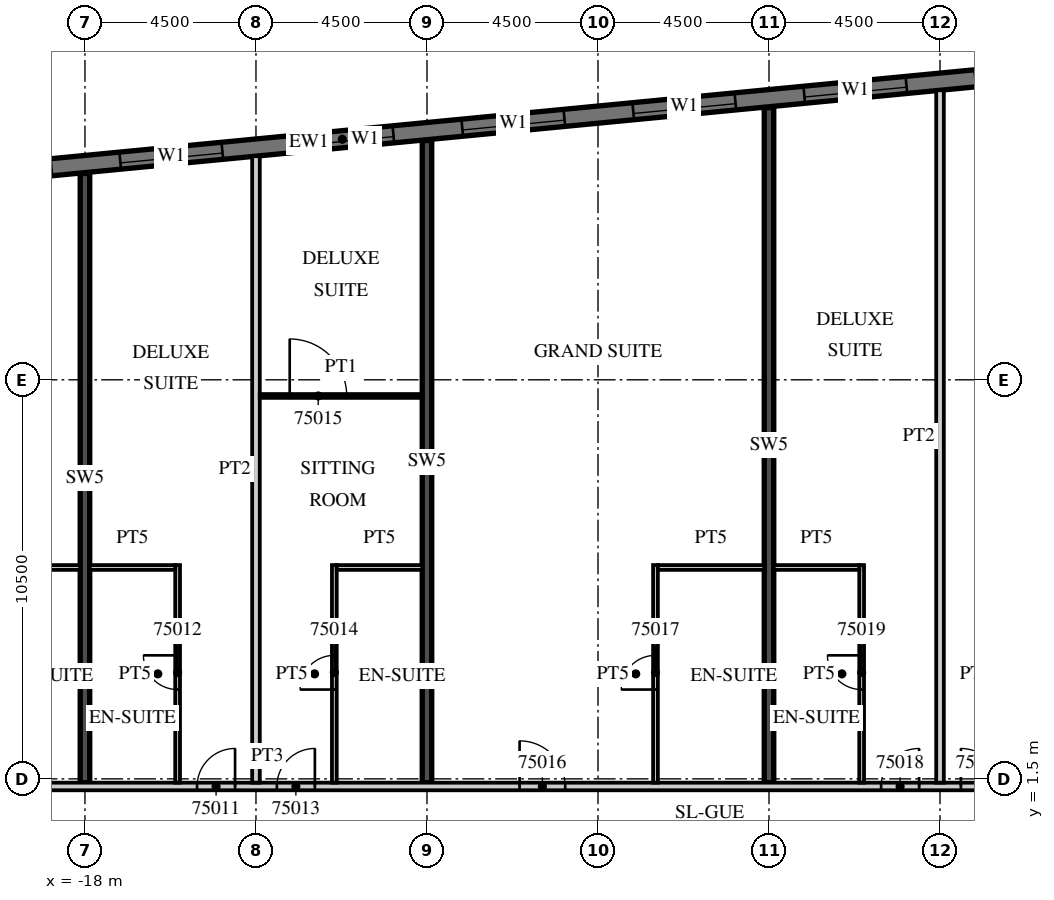
"""IFC4 building model, lengths in metres.
Left out: names, types, materials, properties, quantities, classifications, styles, units other than length and angle.
Written with IfcOpenShell. Run it as: python <this file> out.ifc"""

import sys

from ifc_helpers import new_model, si_unit, direction, frame, frame_2d, origin, place, context, subcontext, project, spatial, rectangle, extrude, element, fill, save


model = new_model("IFC4")
c1 = context("Model", 3, precision=1e-05, world=origin(), true_north=direction((0.0, 1.0)))
c2 = subcontext(c1, "Body", "Model", "MODEL_VIEW")
j1 = project(units=[si_unit("LENGTHUNIT", "METRE"), si_unit("PLANEANGLEUNIT", "RADIAN")], contexts=[c1])
p1 = place(None, origin())
s1 = spatial("IfcSite", under=j1, at=p1, CompositionType="ELEMENT")
p2 = place(p1, origin())
s2 = spatial("IfcBuilding", under=s1, at=p2, CompositionType="ELEMENT")
p3 = place(p2, frame((0.0, 0.0, 298.2)))
s3 = spatial("IfcBuildingStorey", under=s2, at=p3, CompositionType="ELEMENT", Elevation=298.2)
p4 = place(p3, frame((-18.0, 1.4, 0.0), z_axis=(0.0, 0.0, 1.0), x_axis=(0.0, 1.0, 0.0)))
e1 = element("IfcWall", 1, at=p4, inside=s3, PredefinedType="SHEAR", context=c2, shape_type="SweptSolid", body=[
    extrude(rectangle(XDim=16.03, YDim=0.25, at=frame_2d((8.015, 0.0))), origin(), (0.0, 0.0, 1.0), 3.3),
])
p5 = place(p3, frame((-9.0, 1.4, 0.0), z_axis=(0.0, 0.0, 1.0), x_axis=(0.0, 1.0, 0.0)))
e2 = element("IfcWall", 2, at=p5, inside=s3, PredefinedType="SHEAR", context=c2, shape_type="SweptSolid", body=[
    extrude(rectangle(XDim=16.896, YDim=0.25, at=frame_2d((8.448, 0.0))), origin(), (0.0, 0.0, 1.0), 3.3),
])
p6 = place(p3, frame((0.0, 1.4, 0.0), z_axis=(0.0, 0.0, 1.0), x_axis=(0.0, 1.0, 0.0)))
e3 = element("IfcWall", 3, at=p6, inside=s3, PredefinedType="SHEAR", context=c2, shape_type="SweptSolid", body=[
    extrude(rectangle(XDim=17.763, YDim=0.25, at=frame_2d((8.881, 0.0))), origin(), (0.0, 0.0, 1.0), 3.3),
])
p7 = place(p3, frame((13.521, 20.713, 0.0), z_axis=(0.0, 0.0, 1.0), x_axis=(-0.995396277313, -0.095844932638, 0.0)))
e4 = element("IfcWall", 4, at=p7, inside=s3, PredefinedType="SOLIDWALL", context=c2, shape_type="SweptSolid", body=[
    extrude(rectangle(XDim=51.495, YDim=0.45, at=frame_2d((25.748, 0.0))), origin(), (0.0, 0.0, 1.0), 3.02),
])
p8 = place(p7, frame((0.91, 0.0, 0.45)))
e5 = element("IfcOpeningElement", 5, at=p8, cuts=e4, PredefinedType="OPENING", context=c2, shape_type="SweptSolid", body=[
    extrude(rectangle(XDim=2.7, YDim=2.25, at=frame_2d((1.35, 1.125))), frame((0.0, 0.235, 0.0), z_axis=(0.0, -1.0, 0.0), x_axis=(1.0, 0.0, 0.0)), (0.0, 0.0, 1.0), 0.47),
])
p9 = place(p7, frame((5.431, 0.0, 0.45)))
e6 = element("IfcOpeningElement", 6, at=p9, cuts=e4, PredefinedType="OPENING", context=c2, shape_type="SweptSolid", body=[
    extrude(rectangle(XDim=2.7, YDim=2.25, at=frame_2d((1.35, 1.125))), frame((0.0, 0.235, 0.0), z_axis=(0.0, -1.0, 0.0), x_axis=(1.0, 0.0, 0.0)), (0.0, 0.0, 1.0), 0.47),
])
p10 = place(p7, frame((9.952, 0.0, 0.45)))
e7 = element("IfcOpeningElement", 7, at=p10, cuts=e4, PredefinedType="OPENING", context=c2, shape_type="SweptSolid", body=[
    extrude(rectangle(XDim=2.7, YDim=2.25, at=frame_2d((1.35, 1.125))), frame((0.0, 0.235, 0.0), z_axis=(0.0, -1.0, 0.0), x_axis=(1.0, 0.0, 0.0)), (0.0, 0.0, 1.0), 0.47),
])
p11 = place(p7, frame((14.473, 0.0, 0.45)))
e8 = element("IfcOpeningElement", 8, at=p11, cuts=e4, PredefinedType="OPENING", context=c2, shape_type="SweptSolid", body=[
    extrude(rectangle(XDim=2.7, YDim=2.25, at=frame_2d((1.35, 1.125))), frame((0.0, 0.235, 0.0), z_axis=(0.0, -1.0, 0.0), x_axis=(1.0, 0.0, 0.0)), (0.0, 0.0, 1.0), 0.47),
])
p12 = place(p7, frame((18.994, 0.0, 0.45)))
e9 = element("IfcOpeningElement", 9, at=p12, cuts=e4, PredefinedType="OPENING", context=c2, shape_type="SweptSolid", body=[
    extrude(rectangle(XDim=2.7, YDim=2.25, at=frame_2d((1.35, 1.125))), frame((0.0, 0.235, 0.0), z_axis=(0.0, -1.0, 0.0), x_axis=(1.0, 0.0, 0.0)), (0.0, 0.0, 1.0), 0.47),
])
p13 = place(p7, frame((23.514, 0.0, 0.45)))
e10 = element("IfcOpeningElement", 10, at=p13, cuts=e4, PredefinedType="OPENING", context=c2, shape_type="SweptSolid", body=[
    extrude(rectangle(XDim=2.7, YDim=2.25, at=frame_2d((1.35, 1.125))), frame((0.0, 0.235, 0.0), z_axis=(0.0, -1.0, 0.0), x_axis=(1.0, 0.0, 0.0)), (0.0, 0.0, 1.0), 0.47),
])
p14 = place(p7, frame((28.035, 0.0, 0.45)))
e11 = element("IfcOpeningElement", 11, at=p14, cuts=e4, PredefinedType="OPENING", context=c2, shape_type="SweptSolid", body=[
    extrude(rectangle(XDim=2.7, YDim=2.25, at=frame_2d((1.35, 1.125))), frame((0.0, 0.235, 0.0), z_axis=(0.0, -1.0, 0.0), x_axis=(1.0, 0.0, 0.0)), (0.0, 0.0, 1.0), 0.47),
])
p15 = place(p7, frame((32.556, 0.0, 0.45)))
e12 = element("IfcOpeningElement", 12, at=p15, cuts=e4, PredefinedType="OPENING", context=c2, shape_type="SweptSolid", body=[
    extrude(rectangle(XDim=2.7, YDim=2.25, at=frame_2d((1.35, 1.125))), frame((0.0, 0.235, 0.0), z_axis=(0.0, -1.0, 0.0), x_axis=(1.0, 0.0, 0.0)), (0.0, 0.0, 1.0), 0.47),
])
p16 = place(p7, frame((37.077, 0.0, 0.45)))
e13 = element("IfcOpeningElement", 13, at=p16, cuts=e4, PredefinedType="OPENING", context=c2, shape_type="SweptSolid", body=[
    extrude(rectangle(XDim=2.7, YDim=2.25, at=frame_2d((1.35, 1.125))), frame((0.0, 0.235, 0.0), z_axis=(0.0, -1.0, 0.0), x_axis=(1.0, 0.0, 0.0)), (0.0, 0.0, 1.0), 0.47),
])
p17 = place(p7, frame((41.598, 0.0, 0.45)))
e14 = element("IfcOpeningElement", 14, at=p17, cuts=e4, PredefinedType="OPENING", context=c2, shape_type="SweptSolid", body=[
    extrude(rectangle(XDim=2.7, YDim=2.25, at=frame_2d((1.35, 1.125))), frame((0.0, 0.235, 0.0), z_axis=(0.0, -1.0, 0.0), x_axis=(1.0, 0.0, 0.0)), (0.0, 0.0, 1.0), 0.47),
])
p18 = place(p7, frame((46.118, 0.0, 0.45)))
e15 = element("IfcOpeningElement", 15, at=p18, cuts=e4, PredefinedType="OPENING", context=c2, shape_type="SweptSolid", body=[
    extrude(rectangle(XDim=2.7, YDim=2.25, at=frame_2d((1.35, 1.125))), frame((0.0, 0.235, 0.0), z_axis=(0.0, -1.0, 0.0), x_axis=(1.0, 0.0, 0.0)), (0.0, 0.0, 1.0), 0.47),
])
p19 = place(p3, frame((-39.909, 1.3, 0.0), z_axis=(0.0, 0.0, 1.0), x_axis=(1.0, 0.0, 0.0)))
e16 = element("IfcWall", 16, at=p19, inside=s3, PredefinedType="PARTITIONING", context=c2, shape_type="SweptSolid", body=[
    extrude(rectangle(XDim=53.409, YDim=0.2, at=frame_2d((26.705, 0.0))), origin(), (0.0, 0.0, 1.0), 3.02),
])
p20 = place(p19, frame((0.255, 0.0, 0.0)))
e17 = element("IfcOpeningElement", 17, at=p20, cuts=e16, PredefinedType="OPENING", context=c2, shape_type="SweptSolid", body=[
    extrude(rectangle(XDim=0.9, YDim=2.1, at=frame_2d((0.45, 1.05))), frame((0.0, 0.11, 0.0), z_axis=(0.0, -1.0, 0.0), x_axis=(1.0, 0.0, 0.0)), (0.0, 0.0, 1.0), 0.22),
])
p21 = place(p19, frame((4.484, 0.0, 0.0)))
e18 = element("IfcOpeningElement", 18, at=p21, cuts=e16, PredefinedType="OPENING", context=c2, shape_type="SweptSolid", body=[
    extrude(rectangle(XDim=1.0, YDim=2.1, at=frame_2d((0.5, 1.05))), frame((0.0, 0.11, 0.0), z_axis=(0.0, -1.0, 0.0), x_axis=(1.0, 0.0, 0.0)), (0.0, 0.0, 1.0), 0.22),
])
p22 = place(p19, frame((11.334, 0.0, 0.0)))
e19 = element("IfcOpeningElement", 19, at=p22, cuts=e16, PredefinedType="OPENING", context=c2, shape_type="SweptSolid", body=[
    extrude(rectangle(XDim=1.0, YDim=2.1, at=frame_2d((0.5, 1.05))), frame((0.0, 0.11, 0.0), z_axis=(0.0, -1.0, 0.0), x_axis=(1.0, 0.0, 0.0)), (0.0, 0.0, 1.0), 0.22),
])
p23 = place(p19, frame((15.347, 0.0, 0.0)))
e20 = element("IfcOpeningElement", 20, at=p23, cuts=e16, PredefinedType="OPENING", context=c2, shape_type="SweptSolid", body=[
    extrude(rectangle(XDim=1.2, YDim=2.1, at=frame_2d((0.6, 1.05))), frame((0.0, 0.11, 0.0), z_axis=(0.0, -1.0, 0.0), x_axis=(1.0, 0.0, 0.0)), (0.0, 0.0, 1.0), 0.22),
])
p24 = place(p19, frame((24.859, 0.0, 0.0)))
e21 = element("IfcOpeningElement", 21, at=p24, cuts=e16, PredefinedType="OPENING", context=c2, shape_type="SweptSolid", body=[
    extrude(rectangle(XDim=1.0, YDim=2.1, at=frame_2d((0.5, 1.05))), frame((0.0, 0.11, 0.0), z_axis=(0.0, -1.0, 0.0), x_axis=(1.0, 0.0, 0.0)), (0.0, 0.0, 1.0), 0.22),
])
p25 = place(p19, frame((26.959, 0.0, 0.0)))
e22 = element("IfcOpeningElement", 22, at=p25, cuts=e16, PredefinedType="OPENING", context=c2, shape_type="SweptSolid", body=[
    extrude(rectangle(XDim=1.0, YDim=2.1, at=frame_2d((0.5, 1.05))), frame((0.0, 0.11, 0.0), z_axis=(0.0, -1.0, 0.0), x_axis=(1.0, 0.0, 0.0)), (0.0, 0.0, 1.0), 0.22),
])
p26 = place(p19, frame((33.346, 0.0, 0.0)))
e23 = element("IfcOpeningElement", 23, at=p26, cuts=e16, PredefinedType="OPENING", context=c2, shape_type="SweptSolid", body=[
    extrude(rectangle(XDim=1.2, YDim=2.1, at=frame_2d((0.6, 1.05))), frame((0.0, 0.11, 0.0), z_axis=(0.0, -1.0, 0.0), x_axis=(1.0, 0.0, 0.0)), (0.0, 0.0, 1.0), 0.22),
])
p27 = place(p19, frame((42.859, 0.0, 0.0)))
e24 = element("IfcOpeningElement", 24, at=p27, cuts=e16, PredefinedType="OPENING", context=c2, shape_type="SweptSolid", body=[
    extrude(rectangle(XDim=1.0, YDim=2.1, at=frame_2d((0.5, 1.05))), frame((0.0, 0.11, 0.0), z_axis=(0.0, -1.0, 0.0), x_axis=(1.0, 0.0, 0.0)), (0.0, 0.0, 1.0), 0.22),
])
p28 = place(p19, frame((44.959, 0.0, 0.0)))
e25 = element("IfcOpeningElement", 25, at=p28, cuts=e16, PredefinedType="OPENING", context=c2, shape_type="SweptSolid", body=[
    extrude(rectangle(XDim=1.0, YDim=2.1, at=frame_2d((0.5, 1.05))), frame((0.0, 0.11, 0.0), z_axis=(0.0, -1.0, 0.0), x_axis=(1.0, 0.0, 0.0)), (0.0, 0.0, 1.0), 0.22),
])
p29 = place(p19, frame((49.484, 0.0, 0.0)))
e26 = element("IfcOpeningElement", 26, at=p29, cuts=e16, PredefinedType="OPENING", context=c2, shape_type="SweptSolid", body=[
    extrude(rectangle(XDim=1.0, YDim=2.1, at=frame_2d((0.5, 1.05))), frame((0.0, 0.11, 0.0), z_axis=(0.0, -1.0, 0.0), x_axis=(1.0, 0.0, 0.0)), (0.0, 0.0, 1.0), 0.22),
])
p30 = place(p3, frame((-20.925, 7.062, 0.0), z_axis=(0.0, 0.0, 1.0), x_axis=(1.0, 0.0, 0.0)))
e27 = element("IfcWall", 27, at=p30, inside=s3, PredefinedType="PARTITIONING", context=c2, shape_type="SweptSolid", body=[
    extrude(rectangle(XDim=2.8, YDim=0.125, at=frame_2d((1.4, 0.0))), origin(), (0.0, 0.0, 1.0), 3.02),
])
p31 = place(p3, frame((-13.5, 1.4, 0.0), z_axis=(0.0, 0.0, 1.0), x_axis=(0.0, 1.0, 0.0)))
e28 = element("IfcWall", 28, at=p31, inside=s3, PredefinedType="PARTITIONING", context=c2, shape_type="SweptSolid", body=[
    extrude(rectangle(XDim=16.485, YDim=0.2, at=frame_2d((8.243, 0.0))), origin(), (0.0, 0.0, 1.0), 3.02),
])
p32 = place(p3, frame((-15.562, 1.4, 0.0), z_axis=(0.0, 0.0, 1.0), x_axis=(0.0, 1.0, 0.0)))
e29 = element("IfcWall", 29, at=p32, inside=s3, PredefinedType="PARTITIONING", context=c2, shape_type="SweptSolid", body=[
    extrude(rectangle(XDim=5.725, YDim=0.125, at=frame_2d((2.863, 0.0))), origin(), (0.0, 0.0, 1.0), 3.02),
])
p33 = place(p32, frame((2.45, 0.0, 0.0)))
e30 = element("IfcOpeningElement", 30, at=p33, cuts=e29, PredefinedType="OPENING", context=c2, shape_type="SweptSolid", body=[
    extrude(rectangle(XDim=0.9, YDim=2.1, at=frame_2d((0.45, 1.05))), frame((0.0, 0.073, 0.0), z_axis=(0.0, -1.0, 0.0), x_axis=(1.0, 0.0, 0.0)), (0.0, 0.0, 1.0), 0.145),
])
p34 = place(p3, frame((-17.875, 7.062, 0.0), z_axis=(0.0, 0.0, 1.0), x_axis=(1.0, 0.0, 0.0)))
e31 = element("IfcWall", 31, at=p34, inside=s3, PredefinedType="PARTITIONING", context=c2, shape_type="SweptSolid", body=[
    extrude(rectangle(XDim=2.25, YDim=0.125, at=frame_2d((1.125, 0.0))), origin(), (0.0, 0.0, 1.0), 3.02),
])
p35 = place(p3, frame((-11.438, 1.4, 0.0), z_axis=(0.0, 0.0, 1.0), x_axis=(0.0, 1.0, 0.0)))
e32 = element("IfcWall", 32, at=p35, inside=s3, PredefinedType="PARTITIONING", context=c2, shape_type="SweptSolid", body=[
    extrude(rectangle(XDim=5.725, YDim=0.125, at=frame_2d((2.863, 0.0))), origin(), (0.0, 0.0, 1.0), 3.02),
])
p36 = place(p35, frame((2.45, 0.0, 0.0)))
e33 = element("IfcOpeningElement", 33, at=p36, cuts=e32, PredefinedType="OPENING", context=c2, shape_type="SweptSolid", body=[
    extrude(rectangle(XDim=0.9, YDim=2.1, at=frame_2d((0.45, 1.05))), frame((0.0, 0.073, 0.0), z_axis=(0.0, -1.0, 0.0), x_axis=(1.0, 0.0, 0.0)), (0.0, 0.0, 1.0), 0.145),
])
p37 = place(p3, frame((-11.375, 7.062, 0.0), z_axis=(0.0, 0.0, 1.0), x_axis=(1.0, 0.0, 0.0)))
e34 = element("IfcWall", 34, at=p37, inside=s3, PredefinedType="PARTITIONING", context=c2, shape_type="SweptSolid", body=[
    extrude(rectangle(XDim=2.25, YDim=0.125, at=frame_2d((1.125, 0.0))), origin(), (0.0, 0.0, 1.0), 3.02),
])
p38 = place(p3, frame((-13.4, 11.575, 0.0), z_axis=(0.0, 0.0, 1.0), x_axis=(1.0, 0.0, 0.0)))
e35 = element("IfcWall", 35, at=p38, inside=s3, PredefinedType="PARTITIONING", context=c2, shape_type="SweptSolid", body=[
    extrude(rectangle(XDim=4.275, YDim=0.1, at=frame_2d((2.137, 0.0))), origin(), (0.0, 0.0, 1.0), 3.02),
])
p39 = place(p38, frame((0.788, 0.0, 0.0)))
e36 = element("IfcOpeningElement", 36, at=p39, cuts=e35, PredefinedType="OPENING", context=c2, shape_type="SweptSolid", body=[
    extrude(rectangle(XDim=1.5, YDim=2.1, at=frame_2d((0.75, 1.05))), frame((0.0, 0.06, 0.0), z_axis=(0.0, -1.0, 0.0), x_axis=(1.0, 0.0, 0.0)), (0.0, 0.0, 1.0), 0.12),
])
p40 = place(p3, frame((-2.987, 1.4, 0.0), z_axis=(0.0, 0.0, 1.0), x_axis=(0.0, 1.0, 0.0)))
e37 = element("IfcWall", 37, at=p40, inside=s3, PredefinedType="PARTITIONING", context=c2, shape_type="SweptSolid", body=[
    extrude(rectangle(XDim=5.725, YDim=0.125, at=frame_2d((2.863, 0.0))), origin(), (0.0, 0.0, 1.0), 3.02),
])
p41 = place(p40, frame((2.45, 0.0, 0.0)))
e38 = element("IfcOpeningElement", 38, at=p41, cuts=e37, PredefinedType="OPENING", context=c2, shape_type="SweptSolid", body=[
    extrude(rectangle(XDim=0.9, YDim=2.1, at=frame_2d((0.45, 1.05))), frame((0.0, 0.073, 0.0), z_axis=(0.0, -1.0, 0.0), x_axis=(1.0, 0.0, 0.0)), (0.0, 0.0, 1.0), 0.145),
])
p42 = place(p3, frame((-2.925, 7.062, 0.0), z_axis=(0.0, 0.0, 1.0), x_axis=(1.0, 0.0, 0.0)))
e39 = element("IfcWall", 39, at=p42, inside=s3, PredefinedType="PARTITIONING", context=c2, shape_type="SweptSolid", body=[
    extrude(rectangle(XDim=2.8, YDim=0.125, at=frame_2d((1.4, 0.0))), origin(), (0.0, 0.0, 1.0), 3.02),
])
p43 = place(p3, frame((4.5, 1.4, 0.0), z_axis=(0.0, 0.0, 1.0), x_axis=(0.0, 1.0, 0.0)))
e40 = element("IfcWall", 40, at=p43, inside=s3, PredefinedType="PARTITIONING", context=c2, shape_type="SweptSolid", body=[
    extrude(rectangle(XDim=18.218, YDim=0.2, at=frame_2d((9.109, 0.0))), origin(), (0.0, 0.0, 1.0), 3.02),
])
p44 = place(p3, frame((2.438, 1.4, 0.0), z_axis=(0.0, 0.0, 1.0), x_axis=(0.0, 1.0, 0.0)))
e41 = element("IfcWall", 41, at=p44, inside=s3, PredefinedType="PARTITIONING", context=c2, shape_type="SweptSolid", body=[
    extrude(rectangle(XDim=5.725, YDim=0.125, at=frame_2d((2.863, 0.0))), origin(), (0.0, 0.0, 1.0), 3.02),
])
p45 = place(p44, frame((2.45, 0.0, 0.0)))
e42 = element("IfcOpeningElement", 42, at=p45, cuts=e41, PredefinedType="OPENING", context=c2, shape_type="SweptSolid", body=[
    extrude(rectangle(XDim=0.9, YDim=2.1, at=frame_2d((0.45, 1.05))), frame((0.0, 0.073, 0.0), z_axis=(0.0, -1.0, 0.0), x_axis=(1.0, 0.0, 0.0)), (0.0, 0.0, 1.0), 0.145),
])
p46 = place(p3, frame((0.125, 7.062, 0.0), z_axis=(0.0, 0.0, 1.0), x_axis=(1.0, 0.0, 0.0)))
e43 = element("IfcWall", 43, at=p46, inside=s3, PredefinedType="PARTITIONING", context=c2, shape_type="SweptSolid", body=[
    extrude(rectangle(XDim=2.25, YDim=0.125, at=frame_2d((1.125, 0.0))), origin(), (0.0, 0.0, 1.0), 3.02),
])
p47 = place(p10, origin())
e44 = element("IfcWindow", 44, at=p47, inside=s3, PartitioningType="SINGLE_PANEL", PredefinedType="WINDOW", context=c2, shape_type="SweptSolid", body=[
    extrude(rectangle(XDim=2.7, YDim=2.25, at=frame_2d((1.35, 1.125))), frame((0.0, 0.09, 0.0), z_axis=(0.0, -1.0, 0.0), x_axis=(1.0, 0.0, 0.0)), (0.0, 0.0, 1.0), 0.06),
])
fill(e7, e44)
p48 = place(p11, origin())
e45 = element("IfcWindow", 45, at=p48, inside=s3, PartitioningType="SINGLE_PANEL", PredefinedType="WINDOW", context=c2, shape_type="SweptSolid", body=[
    extrude(rectangle(XDim=2.7, YDim=2.25, at=frame_2d((1.35, 1.125))), frame((0.0, 0.09, 0.0), z_axis=(0.0, -1.0, 0.0), x_axis=(1.0, 0.0, 0.0)), (0.0, 0.0, 1.0), 0.06),
])
fill(e8, e45)
p49 = place(p12, origin())
e46 = element("IfcWindow", 46, at=p49, inside=s3, PartitioningType="SINGLE_PANEL", PredefinedType="WINDOW", context=c2, shape_type="SweptSolid", body=[
    extrude(rectangle(XDim=2.7, YDim=2.25, at=frame_2d((1.35, 1.125))), frame((0.0, 0.09, 0.0), z_axis=(0.0, -1.0, 0.0), x_axis=(1.0, 0.0, 0.0)), (0.0, 0.0, 1.0), 0.06),
])
fill(e9, e46)
p50 = place(p13, origin())
e47 = element("IfcWindow", 47, at=p50, inside=s3, PartitioningType="SINGLE_PANEL", PredefinedType="WINDOW", context=c2, shape_type="SweptSolid", body=[
    extrude(rectangle(XDim=2.7, YDim=2.25, at=frame_2d((1.35, 1.125))), frame((0.0, 0.09, 0.0), z_axis=(0.0, -1.0, 0.0), x_axis=(1.0, 0.0, 0.0)), (0.0, 0.0, 1.0), 0.06),
])
fill(e10, e47)
p51 = place(p14, origin())
e48 = element("IfcWindow", 48, at=p51, inside=s3, PartitioningType="SINGLE_PANEL", PredefinedType="WINDOW", context=c2, shape_type="SweptSolid", body=[
    extrude(rectangle(XDim=2.7, YDim=2.25, at=frame_2d((1.35, 1.125))), frame((0.0, 0.09, 0.0), z_axis=(0.0, -1.0, 0.0), x_axis=(1.0, 0.0, 0.0)), (0.0, 0.0, 1.0), 0.06),
])
fill(e11, e48)
p52 = place(p24, origin())
e49 = element("IfcDoor", 49, at=p52, inside=s3, OperationType="SINGLE_SWING_RIGHT", PredefinedType="DOOR", context=c2, shape_type="SweptSolid", body=[
    extrude(rectangle(XDim=1.0, YDim=2.1, at=frame_2d((0.5, 1.05))), frame((0.0, 0.025, 0.0), z_axis=(0.0, -1.0, 0.0), x_axis=(1.0, 0.0, 0.0)), (0.0, 0.0, 1.0), 0.05),
])
fill(e21, e49)
p53 = place(p33, origin())
e50 = element("IfcDoor", 50, at=p53, inside=s3, OperationType="SINGLE_SWING_RIGHT", PredefinedType="DOOR", context=c2, shape_type="SweptSolid", body=[
    extrude(rectangle(XDim=0.9, YDim=2.1, at=frame_2d((0.45, 1.05))), frame((0.0, 0.025, 0.0), z_axis=(0.0, -1.0, 0.0), x_axis=(1.0, 0.0, 0.0)), (0.0, 0.0, 1.0), 0.05),
])
fill(e30, e50)
p54 = place(p25, origin())
e51 = element("IfcDoor", 51, at=p54, inside=s3, OperationType="SINGLE_SWING_RIGHT", PredefinedType="DOOR", context=c2, shape_type="SweptSolid", body=[
    extrude(rectangle(XDim=1.0, YDim=2.1, at=frame_2d((0.5, 1.05))), frame((0.0, 0.025, 0.0), z_axis=(0.0, -1.0, 0.0), x_axis=(1.0, 0.0, 0.0)), (0.0, 0.0, 1.0), 0.05),
])
fill(e22, e51)
p55 = place(p36, origin())
e52 = element("IfcDoor", 52, at=p55, inside=s3, OperationType="SINGLE_SWING_LEFT", PredefinedType="DOOR", context=c2, shape_type="SweptSolid", body=[
    extrude(rectangle(XDim=0.9, YDim=2.1, at=frame_2d((0.45, 1.05))), frame((0.0, 0.025, 0.0), z_axis=(0.0, -1.0, 0.0), x_axis=(1.0, 0.0, 0.0)), (0.0, 0.0, 1.0), 0.05),
])
fill(e33, e52)
p56 = place(p39, origin())
e53 = element("IfcDoor", 53, at=p56, inside=s3, OperationType="SINGLE_SWING_LEFT", PredefinedType="DOOR", context=c2, shape_type="SweptSolid", body=[
    extrude(rectangle(XDim=1.5, YDim=2.1, at=frame_2d((0.75, 1.05))), frame((0.0, 0.025, 0.0), z_axis=(0.0, -1.0, 0.0), x_axis=(1.0, 0.0, 0.0)), (0.0, 0.0, 1.0), 0.05),
])
fill(e36, e53)
p57 = place(p26, origin())
e54 = element("IfcDoor", 54, at=p57, inside=s3, OperationType="SINGLE_SWING_LEFT", PredefinedType="DOOR", context=c2, shape_type="SweptSolid", body=[
    extrude(rectangle(XDim=1.2, YDim=2.1, at=frame_2d((0.6, 1.05))), frame((0.0, 0.025, 0.0), z_axis=(0.0, -1.0, 0.0), x_axis=(1.0, 0.0, 0.0)), (0.0, 0.0, 1.0), 0.05),
])
fill(e23, e54)
p58 = place(p41, origin())
e55 = element("IfcDoor", 55, at=p58, inside=s3, OperationType="SINGLE_SWING_LEFT", PredefinedType="DOOR", context=c2, shape_type="SweptSolid", body=[
    extrude(rectangle(XDim=0.9, YDim=2.1, at=frame_2d((0.45, 1.05))), frame((0.0, 0.025, 0.0), z_axis=(0.0, -1.0, 0.0), x_axis=(1.0, 0.0, 0.0)), (0.0, 0.0, 1.0), 0.05),
])
fill(e38, e55)
p59 = place(p27, origin())
e56 = element("IfcDoor", 56, at=p59, inside=s3, OperationType="SINGLE_SWING_RIGHT", PredefinedType="DOOR", context=c2, shape_type="SweptSolid", body=[
    extrude(rectangle(XDim=1.0, YDim=2.1, at=frame_2d((0.5, 1.05))), frame((0.0, 0.025, 0.0), z_axis=(0.0, -1.0, 0.0), x_axis=(1.0, 0.0, 0.0)), (0.0, 0.0, 1.0), 0.05),
])
fill(e24, e56)
p60 = place(p45, origin())
e57 = element("IfcDoor", 57, at=p60, inside=s3, OperationType="SINGLE_SWING_RIGHT", PredefinedType="DOOR", context=c2, shape_type="SweptSolid", body=[
    extrude(rectangle(XDim=0.9, YDim=2.1, at=frame_2d((0.45, 1.05))), frame((0.0, 0.025, 0.0), z_axis=(0.0, -1.0, 0.0), x_axis=(1.0, 0.0, 0.0)), (0.0, 0.0, 1.0), 0.05),
])
fill(e42, e57)
p61 = place(p28, origin())
e58 = element("IfcDoor", 58, at=p61, inside=s3, OperationType="SINGLE_SWING_LEFT", PredefinedType="DOOR", context=c2, shape_type="SweptSolid", body=[
    extrude(rectangle(XDim=1.0, YDim=2.1, at=frame_2d((0.5, 1.05))), frame((0.0, 0.025, 0.0), z_axis=(0.0, -1.0, 0.0), x_axis=(1.0, 0.0, 0.0)), (0.0, 0.0, 1.0), 0.05),
])
fill(e25, e58)
save(model, sys.argv[1])
